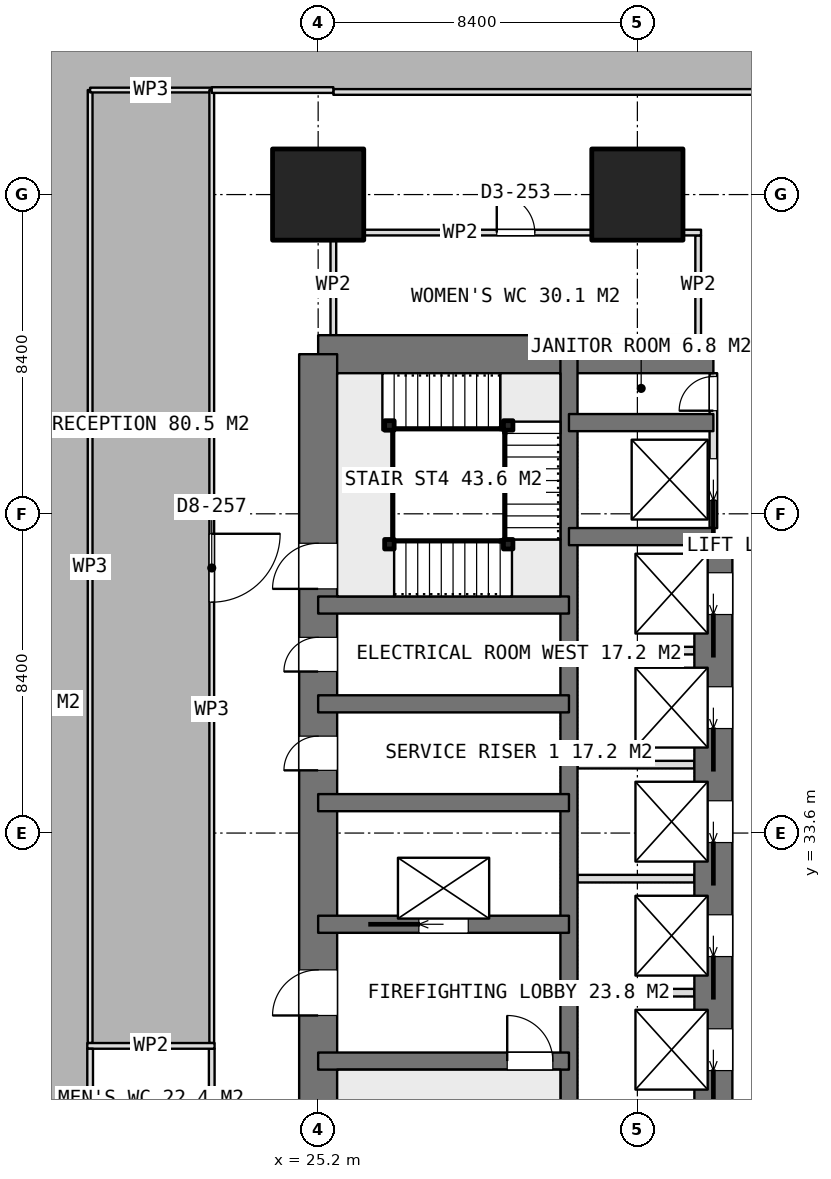
"""IFC4 building model, lengths in metres.
Left out: names, types, materials, properties, quantities, classifications, styles, units other than length and angle.
Written with IfcOpenShell. Run it as: python <this file> out.ifc"""

import sys

from ifc_helpers import new_model, si_unit, direction, frame, frame_2d, origin, origin_2d, place, context, subcontext, project, spatial, rectangle, extrude, element, fill, save


model = new_model("IFC4")
c1 = context("Model", 3, precision=1e-05, world=origin(), true_north=direction((0.0, 1.0)))
c2 = subcontext(c1, "Body", "Model", "MODEL_VIEW")
j1 = project(units=[si_unit("LENGTHUNIT", "METRE"), si_unit("PLANEANGLEUNIT", "RADIAN")], contexts=[c1])
p1 = place(None, origin())
s1 = spatial("IfcSite", under=j1, at=p1, CompositionType="ELEMENT")
p2 = place(p1, origin())
s2 = spatial("IfcBuilding", under=s1, at=p2, CompositionType="ELEMENT")
p3 = place(p2, frame((0.0, 0.0, 232.7)))
s3 = spatial("IfcBuildingStorey", under=s2, at=p3, CompositionType="ELEMENT", Elevation=232.7)
p4 = place(p3, frame((25.2, 46.2, 0.0), z_axis=(0.0, 0.0, 1.0), x_axis=(1.0, 0.0, 0.0)))
e1 = element("IfcWall", 1, at=p4, inside=s3, PredefinedType="SHEAR", context=c2, shape_type="SweptSolid", body=[
    extrude(rectangle(XDim=10.4, YDim=1.0, at=frame_2d((5.2, 0.0))), origin(), (0.0, 0.0, 1.0), 3.75),
])
p5 = place(p3, frame((25.2, 21.0, 0.0), z_axis=(0.0, 0.0, 1.0), x_axis=(0.0, 1.0, 0.0)))
e2 = element("IfcWall", 2, at=p5, inside=s3, PredefinedType="SHEAR", context=c2, shape_type="SweptSolid", body=[
    extrude(rectangle(XDim=25.2, YDim=1.0, at=frame_2d((12.6, 0.0))), origin(), (0.0, 0.0, 1.0), 3.75),
])
p6 = place(p5, frame((7.8, 0.0, 0.0)))
e3 = element("IfcOpeningElement", 3, at=p6, cuts=e2, PredefinedType="OPENING", context=c2, shape_type="SweptSolid", body=[
    extrude(rectangle(XDim=1.2, YDim=2.1, at=frame_2d((0.6, 1.05))), frame((0.0, 0.51, 0.0), z_axis=(0.0, -1.0, 0.0), x_axis=(1.0, 0.0, 0.0)), (0.0, 0.0, 1.0), 1.02),
])
p7 = place(p5, frame((14.25, 0.0, 0.0)))
e4 = element("IfcOpeningElement", 4, at=p7, cuts=e2, PredefinedType="OPENING", context=c2, shape_type="SweptSolid", body=[
    extrude(rectangle(XDim=0.9, YDim=2.1, at=frame_2d((0.45, 1.05))), frame((0.0, 0.51, 0.0), z_axis=(0.0, -1.0, 0.0), x_axis=(1.0, 0.0, 0.0)), (0.0, 0.0, 1.0), 1.02),
])
p8 = place(p5, frame((16.85, 0.0, 0.0)))
e5 = element("IfcOpeningElement", 5, at=p8, cuts=e2, PredefinedType="OPENING", context=c2, shape_type="SweptSolid", body=[
    extrude(rectangle(XDim=0.9, YDim=2.1, at=frame_2d((0.45, 1.05))), frame((0.0, 0.51, 0.0), z_axis=(0.0, -1.0, 0.0), x_axis=(1.0, 0.0, 0.0)), (0.0, 0.0, 1.0), 1.02),
])
p9 = place(p5, frame((19.025, 0.0, 0.0)))
e6 = element("IfcOpeningElement", 6, at=p9, cuts=e2, PredefinedType="OPENING", context=c2, shape_type="SweptSolid", body=[
    extrude(rectangle(XDim=1.2, YDim=2.1, at=frame_2d((0.6, 1.05))), frame((0.0, 0.51, 0.0), z_axis=(0.0, -1.0, 0.0), x_axis=(1.0, 0.0, 0.0)), (0.0, 0.0, 1.0), 1.02),
])
p10 = place(p3, frame((31.8, 21.0, 0.0), z_axis=(0.0, 0.0, 1.0), x_axis=(0.0, 1.0, 0.0)))
e7 = element("IfcWall", 7, at=p10, inside=s3, PredefinedType="SHEAR", context=c2, shape_type="SweptSolid", body=[
    extrude(rectangle(XDim=25.2, YDim=0.45, at=frame_2d((12.6, 0.0))), origin(), (0.0, 0.0, 1.0), 3.75),
])
p11 = place(p3, frame((35.6, 23.4, 0.0), z_axis=(0.0, 0.0, 1.0), x_axis=(0.0, 1.0, 0.0)))
e8 = element("IfcWall", 8, at=p11, inside=s3, PredefinedType="SHEAR", context=c2, shape_type="SweptSolid", body=[
    extrude(rectangle(XDim=18.0, YDim=1.0, at=frame_2d((9.0, 0.0))), origin(), (0.0, 0.0, 1.0), 3.75),
])
p12 = place(p11, frame((0.95, 0.0, 0.0)))
e9 = element("IfcOpeningElement", 9, at=p12, cuts=e8, PredefinedType="OPENING", context=c2, shape_type="SweptSolid", body=[
    extrude(rectangle(XDim=1.1, YDim=2.1, at=frame_2d((0.55, 1.05))), frame((0.0, 0.51, 0.0), z_axis=(0.0, -1.0, 0.0), x_axis=(1.0, 0.0, 0.0)), (0.0, 0.0, 1.0), 1.02),
])
p13 = place(p11, frame((3.95, 0.0, 0.0)))
e10 = element("IfcOpeningElement", 10, at=p13, cuts=e8, PredefinedType="OPENING", context=c2, shape_type="SweptSolid", body=[
    extrude(rectangle(XDim=1.1, YDim=2.1, at=frame_2d((0.55, 1.05))), frame((0.0, 0.51, 0.0), z_axis=(0.0, -1.0, 0.0), x_axis=(1.0, 0.0, 0.0)), (0.0, 0.0, 1.0), 1.02),
])
p14 = place(p11, frame((6.95, 0.0, 0.0)))
e11 = element("IfcOpeningElement", 11, at=p14, cuts=e8, PredefinedType="OPENING", context=c2, shape_type="SweptSolid", body=[
    extrude(rectangle(XDim=1.1, YDim=2.1, at=frame_2d((0.55, 1.05))), frame((0.0, 0.51, 0.0), z_axis=(0.0, -1.0, 0.0), x_axis=(1.0, 0.0, 0.0)), (0.0, 0.0, 1.0), 1.02),
])
p15 = place(p11, frame((9.95, 0.0, 0.0)))
e12 = element("IfcOpeningElement", 12, at=p15, cuts=e8, PredefinedType="OPENING", context=c2, shape_type="SweptSolid", body=[
    extrude(rectangle(XDim=1.1, YDim=2.1, at=frame_2d((0.55, 1.05))), frame((0.0, 0.51, 0.0), z_axis=(0.0, -1.0, 0.0), x_axis=(1.0, 0.0, 0.0)), (0.0, 0.0, 1.0), 1.02),
])
p16 = place(p11, frame((12.95, 0.0, 0.0)))
e13 = element("IfcOpeningElement", 13, at=p16, cuts=e8, PredefinedType="OPENING", context=c2, shape_type="SweptSolid", body=[
    extrude(rectangle(XDim=1.1, YDim=2.1, at=frame_2d((0.55, 1.05))), frame((0.0, 0.51, 0.0), z_axis=(0.0, -1.0, 0.0), x_axis=(1.0, 0.0, 0.0)), (0.0, 0.0, 1.0), 1.02),
])
p17 = place(p11, frame((15.95, 0.0, 0.0)))
e14 = element("IfcOpeningElement", 14, at=p17, cuts=e8, PredefinedType="OPENING", context=c2, shape_type="SweptSolid", body=[
    extrude(rectangle(XDim=1.1, YDim=2.1, at=frame_2d((0.55, 1.05))), frame((0.0, 0.51, 0.0), z_axis=(0.0, -1.0, 0.0), x_axis=(1.0, 0.0, 0.0)), (0.0, 0.0, 1.0), 1.02),
])
for number, where, z_axis, x_axis in (
    (15, (31.8, 41.4, 0.0), (0.0, 0.0, 1.0), (1.0, 0.0, 0.0)),
    (16, (31.8, 44.4, 0.0), (0.0, 0.0, 1.0), (1.0, 0.0, 0.0)),
):
    element("IfcWall", number, at=place(p3, frame(where, z_axis=z_axis, x_axis=x_axis)), inside=s3, PredefinedType="SHEAR", context=c2, shape_type="SweptSolid", body=[
        extrude(rectangle(XDim=3.8, YDim=0.45, at=frame_2d((1.9, 0.0))), origin(), (0.0, 0.0, 1.0), 3.75),
    ])
p18 = place(p3, frame((25.2, 27.6, 0.0), z_axis=(0.0, 0.0, 1.0), x_axis=(1.0, 0.0, 0.0)))
e17 = element("IfcWall", 17, at=p18, inside=s3, PredefinedType="SHEAR", context=c2, shape_type="SweptSolid", body=[
    extrude(rectangle(XDim=6.6, YDim=0.45, at=frame_2d((3.3, 0.0))), origin(), (0.0, 0.0, 1.0), 3.75),
])
p19 = place(p18, frame((4.975, 0.0, 0.0)))
e18 = element("IfcOpeningElement", 18, at=p19, cuts=e17, PredefinedType="OPENING", context=c2, shape_type="SweptSolid", body=[
    extrude(rectangle(XDim=1.2, YDim=2.1, at=frame_2d((0.6, 1.05))), frame((0.0, 0.235, 0.0), z_axis=(0.0, -1.0, 0.0), x_axis=(1.0, 0.0, 0.0)), (0.0, 0.0, 1.0), 0.47),
])
p20 = place(p3, frame((25.2, 31.2, 0.0), z_axis=(0.0, 0.0, 1.0), x_axis=(1.0, 0.0, 0.0)))
e19 = element("IfcWall", 19, at=p20, inside=s3, PredefinedType="SHEAR", context=c2, shape_type="SweptSolid", body=[
    extrude(rectangle(XDim=6.6, YDim=0.45, at=frame_2d((3.3, 0.0))), origin(), (0.0, 0.0, 1.0), 3.75),
])
p21 = place(p20, frame((2.65, 0.0, 0.0)))
e20 = element("IfcOpeningElement", 20, at=p21, cuts=e19, PredefinedType="OPENING", context=c2, shape_type="SweptSolid", body=[
    extrude(rectangle(XDim=1.3, YDim=2.1, at=frame_2d((0.65, 1.05))), frame((0.0, 0.235, 0.0), z_axis=(0.0, -1.0, 0.0), x_axis=(1.0, 0.0, 0.0)), (0.0, 0.0, 1.0), 0.47),
])
for number, where, z_axis, x_axis in (
    (21, (25.2, 34.4, 0.0), (0.0, 0.0, 1.0), (1.0, 0.0, 0.0)),
    (22, (25.2, 37.0, 0.0), (0.0, 0.0, 1.0), (1.0, 0.0, 0.0)),
    (23, (25.2, 39.6, 0.0), (0.0, 0.0, 1.0), (1.0, 0.0, 0.0)),
):
    element("IfcWall", number, at=place(p3, frame(where, z_axis=z_axis, x_axis=x_axis)), inside=s3, PredefinedType="SHEAR", context=c2, shape_type="SweptSolid", body=[
        extrude(rectangle(XDim=6.6, YDim=0.45, at=frame_2d((3.3, 0.0))), origin(), (0.0, 0.0, 1.0), 3.75),
    ])
for number, where, z_axis, x_axis in (
    (24, (25.2, 50.4, 0.0), (0.0, 0.0, 1.0), (1.0, 0.0, 0.0)),
    (25, (33.6, 50.4, 0.0), (0.0, 0.0, 1.0), (1.0, 0.0, 0.0)),
):
    element("IfcColumn", number, at=place(p3, frame(where, z_axis=z_axis, x_axis=x_axis)), inside=s3, PredefinedType="COLUMN", context=c2, shape_type="SweptSolid", body=[
        extrude(rectangle(XDim=2.4, YDim=2.4, at=origin_2d()), origin(), (0.0, 0.0, 1.0), 3.75),
    ])
for number, where, z_axis, x_axis in (
    (26, (32.025, 29.4, 0.0), (0.0, 0.0, 1.0), (1.0, 0.0, 0.0)),
    (27, (32.025, 32.4, 0.0), (0.0, 0.0, 1.0), (1.0, 0.0, 0.0)),
    (28, (32.025, 35.4, 0.0), (0.0, 0.0, 1.0), (1.0, 0.0, 0.0)),
    (29, (32.025, 38.4, 0.0), (0.0, 0.0, 1.0), (1.0, 0.0, 0.0)),
):
    element("IfcWall", number, at=place(p3, frame(where, z_axis=z_axis, x_axis=x_axis)), inside=s3, PredefinedType="PARTITIONING", context=c2, shape_type="SweptSolid", body=[
        extrude(rectangle(XDim=3.075, YDim=0.2, at=frame_2d((1.538, 0.0))), origin(), (0.0, 0.0, 1.0), 3.5),
    ])
p22 = place(p3, frame((35.6, 41.625, 0.0), z_axis=(0.0, 0.0, 1.0), x_axis=(0.0, 1.0, 0.0)))
e30 = element("IfcWall", 30, at=p22, inside=s3, PredefinedType="PARTITIONING", context=c2, shape_type="SweptSolid", body=[
    extrude(rectangle(XDim=4.075, YDim=0.2, at=frame_2d((2.038, 0.0))), origin(), (0.0, 0.0, 1.0), 3.5),
])
p23 = place(p22, frame((3.088, 0.0, 0.0)))
e31 = element("IfcOpeningElement", 31, at=p23, cuts=e30, PredefinedType="OPENING", context=c2, shape_type="SweptSolid", body=[
    extrude(rectangle(XDim=0.9, YDim=2.1, at=frame_2d((0.45, 1.05))), frame((0.0, 0.11, 0.0), z_axis=(0.0, -1.0, 0.0), x_axis=(1.0, 0.0, 0.0)), (0.0, 0.0, 1.0), 0.22),
])
p24 = place(p22, frame((0.725, 0.0, 0.0)))
e32 = element("IfcOpeningElement", 32, at=p24, cuts=e30, PredefinedType="OPENING", context=c2, shape_type="SweptSolid", body=[
    extrude(rectangle(XDim=1.1, YDim=2.1, at=frame_2d((0.55, 1.05))), frame((0.0, 0.11, 0.0), z_axis=(0.0, -1.0, 0.0), x_axis=(1.0, 0.0, 0.0)), (0.0, 0.0, 1.0), 0.22),
])
p25 = place(p3, frame((25.525, 49.4, 0.0), z_axis=(0.0, 0.0, 1.0), x_axis=(1.0, 0.0, 0.0)))
e33 = element("IfcWall", 33, at=p25, inside=s3, PredefinedType="PARTITIONING", context=c2, shape_type="SweptSolid", body=[
    extrude(rectangle(XDim=9.75, YDim=0.15, at=frame_2d((4.875, 0.0))), origin(), (0.0, 0.0, 1.0), 3.5),
])
p26 = place(p25, frame((4.375, 0.0, 0.0)))
e34 = element("IfcOpeningElement", 34, at=p26, cuts=e33, PredefinedType="OPENING", context=c2, shape_type="SweptSolid", body=[
    extrude(rectangle(XDim=1.0, YDim=2.1, at=frame_2d((0.5, 1.05))), frame((0.0, 0.085, 0.0), z_axis=(0.0, -1.0, 0.0), x_axis=(1.0, 0.0, 0.0)), (0.0, 0.0, 1.0), 0.17),
])
for number, where, z_axis, x_axis in (
    (35, (25.6, 46.7, 0.0), (0.0, 0.0, 1.0), (0.0, 1.0, 0.0)),
    (36, (35.2, 46.7, 0.0), (0.0, 0.0, 1.0), (0.0, 1.0, 0.0)),
):
    element("IfcWall", number, at=place(p3, frame(where, z_axis=z_axis, x_axis=x_axis)), inside=s3, PredefinedType="PARTITIONING", context=c2, shape_type="SweptSolid", body=[
        extrude(rectangle(XDim=2.625, YDim=0.15, at=frame_2d((1.312, 0.0))), origin(), (0.0, 0.0, 1.0), 3.5),
    ])
p27 = place(p3, frame((19.125, 28.0, 0.0), z_axis=(0.0, 0.0, 1.0), x_axis=(1.0, 0.0, 0.0)))
e37 = element("IfcWall", 37, at=p27, inside=s3, PredefinedType="PARTITIONING", context=c2, shape_type="SweptSolid", body=[
    extrude(rectangle(XDim=3.35, YDim=0.15, at=frame_2d((1.675, 0.0))), origin(), (0.0, 0.0, 1.0), 3.5),
])
p28 = place(p3, frame((19.2, 21.075, 0.0), z_axis=(0.0, 0.0, 1.0), x_axis=(0.0, 1.0, 0.0)))
e38 = element("IfcWall", 38, at=p28, inside=s3, PredefinedType="PARTITIONING", context=c2, shape_type="SweptSolid", body=[
    extrude(rectangle(XDim=6.85, YDim=0.15, at=frame_2d((3.425, 0.0))), origin(), (0.0, 0.0, 1.0), 3.5),
])
p29 = place(p3, frame((22.4, 21.075, 0.0), z_axis=(0.0, 0.0, 1.0), x_axis=(0.0, 1.0, 0.0)))
e39 = element("IfcWall", 39, at=p29, inside=s3, PredefinedType="PARTITIONING", context=c2, shape_type="SweptSolid", body=[
    extrude(rectangle(XDim=6.85, YDim=0.15, at=frame_2d((3.425, 0.0))), origin(), (0.0, 0.0, 1.0), 3.5),
])
p30 = place(p29, frame((2.925, 0.0, 0.0)))
e40 = element("IfcOpeningElement", 40, at=p30, cuts=e39, PredefinedType="OPENING", context=c2, shape_type="SweptSolid", body=[
    extrude(rectangle(XDim=1.0, YDim=2.1, at=frame_2d((0.5, 1.05))), frame((0.0, 0.085, 0.0), z_axis=(0.0, -1.0, 0.0), x_axis=(1.0, 0.0, 0.0)), (0.0, 0.0, 1.0), 0.17),
])
p31 = place(p3, frame((19.2, 28.075, 0.0), z_axis=(0.0, 0.0, 1.0), x_axis=(0.0, 1.0, 0.0)))
e41 = element("IfcWall", 41, at=p31, inside=s3, PredefinedType="PARTITIONING", context=c2, shape_type="SweptSolid", body=[
    extrude(rectangle(XDim=25.075, YDim=0.125, at=frame_2d((12.538, 0.0))), origin(), (0.0, 0.0, 1.0), 3.5),
])
p32 = place(p3, frame((19.2, 53.15, 0.0), z_axis=(0.0, 0.0, 1.0), x_axis=(1.0, 0.0, 0.0)))
e42 = element("IfcWall", 42, at=p32, inside=s3, PredefinedType="PARTITIONING", context=c2, shape_type="SweptSolid", body=[
    extrude(rectangle(XDim=3.2, YDim=0.125, at=frame_2d((1.6, 0.0))), origin(), (0.0, 0.0, 1.0), 3.5),
])
p33 = place(p3, frame((22.4, 53.15, 0.0), z_axis=(0.0, 0.0, 1.0), x_axis=(0.0, -1.0, 0.0)))
e43 = element("IfcWall", 43, at=p33, inside=s3, PredefinedType="PARTITIONING", context=c2, shape_type="SweptSolid", body=[
    extrude(rectangle(XDim=25.075, YDim=0.125, at=frame_2d((12.538, 0.0))), origin(), (0.0, 0.0, 1.0), 3.5),
])
p34 = place(p33, frame((11.675, 0.0, 0.0)))
e44 = element("IfcOpeningElement", 44, at=p34, cuts=e43, PredefinedType="OPENING", context=c2, shape_type="SweptSolid", body=[
    extrude(rectangle(XDim=1.8, YDim=2.1, at=frame_2d((0.9, 1.05))), frame((0.0, 0.073, 0.0), z_axis=(0.0, -1.0, 0.0), x_axis=(1.0, 0.0, 0.0)), (0.0, 0.0, 1.0), 0.145),
])
p35 = place(p3, frame((53.2, 53.1, 0.0), z_axis=(0.0, 0.0, 1.0), x_axis=(-1.0, 0.0, 0.0)))
e45 = element("IfcWall", 45, at=p35, inside=s3, PredefinedType="PARTITIONING", context=c2, shape_type="SweptSolid", body=[
    extrude(rectangle(XDim=27.6, YDim=0.15, at=frame_2d((13.8, 0.0))), origin(), (0.0, 0.0, 1.0), 3.5),
])
p36 = place(p35, frame((13.3, 0.0, 0.0)))
e46 = element("IfcOpeningElement", 46, at=p36, cuts=e45, PredefinedType="OPENING", context=c2, shape_type="SweptSolid", body=[
    extrude(rectangle(XDim=1.0, YDim=2.1, at=frame_2d((0.5, 1.05))), frame((0.0, 0.085, 0.0), z_axis=(0.0, -1.0, 0.0), x_axis=(1.0, 0.0, 0.0)), (0.0, 0.0, 1.0), 0.17),
])
p37 = place(p3, frame((25.6, 53.15, 0.0), z_axis=(0.0, 0.0, 1.0), x_axis=(-1.0, 0.0, 0.0)))
e47 = element("IfcWall", 47, at=p37, inside=s3, PredefinedType="PARTITIONING", context=c2, shape_type="SweptSolid", body=[
    extrude(rectangle(XDim=3.2, YDim=0.15, at=frame_2d((1.6, 0.0))), origin(), (0.0, 0.0, 1.0), 3.5),
])
for number, where, z_axis, x_axis in (
    (48, (27.075, 41.2, 0.0), (0.0, 0.0, 1.0), (1.0, 0.0, 0.0)),
    (49, (30.2, 41.2, 0.0), (0.0, 0.0, 1.0), (1.0, 0.0, 0.0)),
    (50, (30.2, 44.325, 0.0), (0.0, 0.0, 1.0), (1.0, 0.0, 0.0)),
    (51, (27.075, 44.325, 0.0), (0.0, 0.0, 1.0), (1.0, 0.0, 0.0)),
):
    element("IfcColumn", number, at=place(p3, frame(where, z_axis=z_axis, x_axis=x_axis)), inside=s3, PredefinedType="COLUMN", context=c2, shape_type="SweptSolid", body=[
        extrude(rectangle(XDim=0.25, YDim=0.25, at=origin_2d()), origin(), (0.0, 0.0, 1.0), 3.75),
    ])
p38 = place(p6, origin())
e52 = element("IfcDoor", 52, at=p38, inside=s3, OperationType="SINGLE_SWING_LEFT", PredefinedType="DOOR", context=c2, shape_type="SweptSolid", body=[
    extrude(rectangle(XDim=1.2, YDim=2.1, at=frame_2d((0.6, 1.05))), frame((0.0, 0.025, 0.0), z_axis=(0.0, -1.0, 0.0), x_axis=(1.0, 0.0, 0.0)), (0.0, 0.0, 1.0), 0.05),
])
fill(e3, e52)
p39 = place(p7, origin())
e53 = element("IfcDoor", 53, at=p39, inside=s3, OperationType="SINGLE_SWING_LEFT", PredefinedType="DOOR", context=c2, shape_type="SweptSolid", body=[
    extrude(rectangle(XDim=0.9, YDim=2.1, at=frame_2d((0.45, 1.05))), frame((0.0, 0.025, 0.0), z_axis=(0.0, -1.0, 0.0), x_axis=(1.0, 0.0, 0.0)), (0.0, 0.0, 1.0), 0.05),
])
fill(e4, e53)
p40 = place(p8, origin())
e54 = element("IfcDoor", 54, at=p40, inside=s3, OperationType="SINGLE_SWING_LEFT", PredefinedType="DOOR", context=c2, shape_type="SweptSolid", body=[
    extrude(rectangle(XDim=0.9, YDim=2.1, at=frame_2d((0.45, 1.05))), frame((0.0, 0.025, 0.0), z_axis=(0.0, -1.0, 0.0), x_axis=(1.0, 0.0, 0.0)), (0.0, 0.0, 1.0), 0.05),
])
fill(e5, e54)
p41 = place(p23, origin())
e55 = element("IfcDoor", 55, at=p41, inside=s3, OperationType="SINGLE_SWING_LEFT", PredefinedType="DOOR", context=c2, shape_type="SweptSolid", body=[
    extrude(rectangle(XDim=0.9, YDim=2.1, at=frame_2d((0.45, 1.05))), frame((0.0, 0.025, 0.0), z_axis=(0.0, -1.0, 0.0), x_axis=(1.0, 0.0, 0.0)), (0.0, 0.0, 1.0), 0.05),
])
fill(e31, e55)
p42 = place(p13, origin())
e56 = element("IfcDoor", 56, at=p42, inside=s3, OperationType="SLIDING_TO_LEFT", PredefinedType="USERDEFINED", context=c2, shape_type="SweptSolid", body=[
    extrude(rectangle(XDim=1.1, YDim=2.1, at=frame_2d((0.55, 1.05))), frame((0.0, 0.025, 0.0), z_axis=(0.0, -1.0, 0.0), x_axis=(1.0, 0.0, 0.0)), (0.0, 0.0, 1.0), 0.05),
])
fill(e10, e56)
p43 = place(p14, origin())
e57 = element("IfcDoor", 57, at=p43, inside=s3, OperationType="SLIDING_TO_LEFT", PredefinedType="USERDEFINED", context=c2, shape_type="SweptSolid", body=[
    extrude(rectangle(XDim=1.1, YDim=2.1, at=frame_2d((0.55, 1.05))), frame((0.0, 0.025, 0.0), z_axis=(0.0, -1.0, 0.0), x_axis=(1.0, 0.0, 0.0)), (0.0, 0.0, 1.0), 0.05),
])
fill(e11, e57)
p44 = place(p15, origin())
e58 = element("IfcDoor", 58, at=p44, inside=s3, OperationType="SLIDING_TO_LEFT", PredefinedType="USERDEFINED", context=c2, shape_type="SweptSolid", body=[
    extrude(rectangle(XDim=1.1, YDim=2.1, at=frame_2d((0.55, 1.05))), frame((0.0, 0.025, 0.0), z_axis=(0.0, -1.0, 0.0), x_axis=(1.0, 0.0, 0.0)), (0.0, 0.0, 1.0), 0.05),
])
fill(e12, e58)
p45 = place(p16, origin())
e59 = element("IfcDoor", 59, at=p45, inside=s3, OperationType="SLIDING_TO_LEFT", PredefinedType="USERDEFINED", context=c2, shape_type="SweptSolid", body=[
    extrude(rectangle(XDim=1.1, YDim=2.1, at=frame_2d((0.55, 1.05))), frame((0.0, 0.025, 0.0), z_axis=(0.0, -1.0, 0.0), x_axis=(1.0, 0.0, 0.0)), (0.0, 0.0, 1.0), 0.05),
])
fill(e13, e59)
p46 = place(p17, origin())
e60 = element("IfcDoor", 60, at=p46, inside=s3, OperationType="SLIDING_TO_LEFT", PredefinedType="USERDEFINED", context=c2, shape_type="SweptSolid", body=[
    extrude(rectangle(XDim=1.1, YDim=2.1, at=frame_2d((0.55, 1.05))), frame((0.0, 0.025, 0.0), z_axis=(0.0, -1.0, 0.0), x_axis=(1.0, 0.0, 0.0)), (0.0, 0.0, 1.0), 0.05),
])
fill(e14, e60)
p47 = place(p21, origin())
e61 = element("IfcDoor", 61, at=p47, inside=s3, OperationType="SLIDING_TO_LEFT", PredefinedType="USERDEFINED", context=c2, shape_type="SweptSolid", body=[
    extrude(rectangle(XDim=1.3, YDim=2.1, at=frame_2d((0.65, 1.05))), frame((0.0, 0.025, 0.0), z_axis=(0.0, -1.0, 0.0), x_axis=(1.0, 0.0, 0.0)), (0.0, 0.0, 1.0), 0.05),
])
fill(e20, e61)
p48 = place(p24, origin())
e62 = element("IfcDoor", 62, at=p48, inside=s3, OperationType="SLIDING_TO_LEFT", PredefinedType="USERDEFINED", context=c2, shape_type="SweptSolid", body=[
    extrude(rectangle(XDim=1.1, YDim=2.1, at=frame_2d((0.55, 1.05))), frame((0.0, 0.025, 0.0), z_axis=(0.0, -1.0, 0.0), x_axis=(1.0, 0.0, 0.0)), (0.0, 0.0, 1.0), 0.05),
])
fill(e32, e62)
p49 = place(p26, origin())
e63 = element("IfcDoor", 63, at=p49, inside=s3, OperationType="SINGLE_SWING_LEFT", PredefinedType="DOOR", context=c2, shape_type="SweptSolid", body=[
    extrude(rectangle(XDim=1.0, YDim=2.1, at=frame_2d((0.5, 1.05))), frame((0.0, 0.025, 0.0), z_axis=(0.0, -1.0, 0.0), x_axis=(1.0, 0.0, 0.0)), (0.0, 0.0, 1.0), 0.05),
])
fill(e34, e63)
p50 = place(p34, origin())
e64 = element("IfcDoor", 64, at=p50, inside=s3, OperationType="DOUBLE_DOOR_SINGLE_SWING", PredefinedType="DOOR", context=c2, shape_type="SweptSolid", body=[
    extrude(rectangle(XDim=1.8, YDim=2.1, at=frame_2d((0.9, 1.05))), frame((0.0, 0.025, 0.0), z_axis=(0.0, -1.0, 0.0), x_axis=(1.0, 0.0, 0.0)), (0.0, 0.0, 1.0), 0.05),
])
fill(e44, e64)
p51 = place(p19, origin())
e65 = element("IfcDoor", 65, at=p51, inside=s3, OperationType="SINGLE_SWING_RIGHT", PredefinedType="DOOR", context=c2, shape_type="SweptSolid", body=[
    extrude(rectangle(XDim=1.2, YDim=2.1, at=frame_2d((0.6, 1.05))), frame((0.0, 0.025, 0.0), z_axis=(0.0, -1.0, 0.0), x_axis=(1.0, 0.0, 0.0)), (0.0, 0.0, 1.0), 0.05),
])
fill(e18, e65)
p52 = place(p9, origin())
e66 = element("IfcDoor", 66, at=p52, inside=s3, OperationType="SINGLE_SWING_RIGHT", PredefinedType="DOOR", context=c2, shape_type="SweptSolid", body=[
    extrude(rectangle(XDim=1.2, YDim=2.1, at=frame_2d((0.6, 1.05))), frame((0.0, 0.025, 0.0), z_axis=(0.0, -1.0, 0.0), x_axis=(1.0, 0.0, 0.0)), (0.0, 0.0, 1.0), 0.05),
])
fill(e6, e66)
save(model, sys.argv[1])
